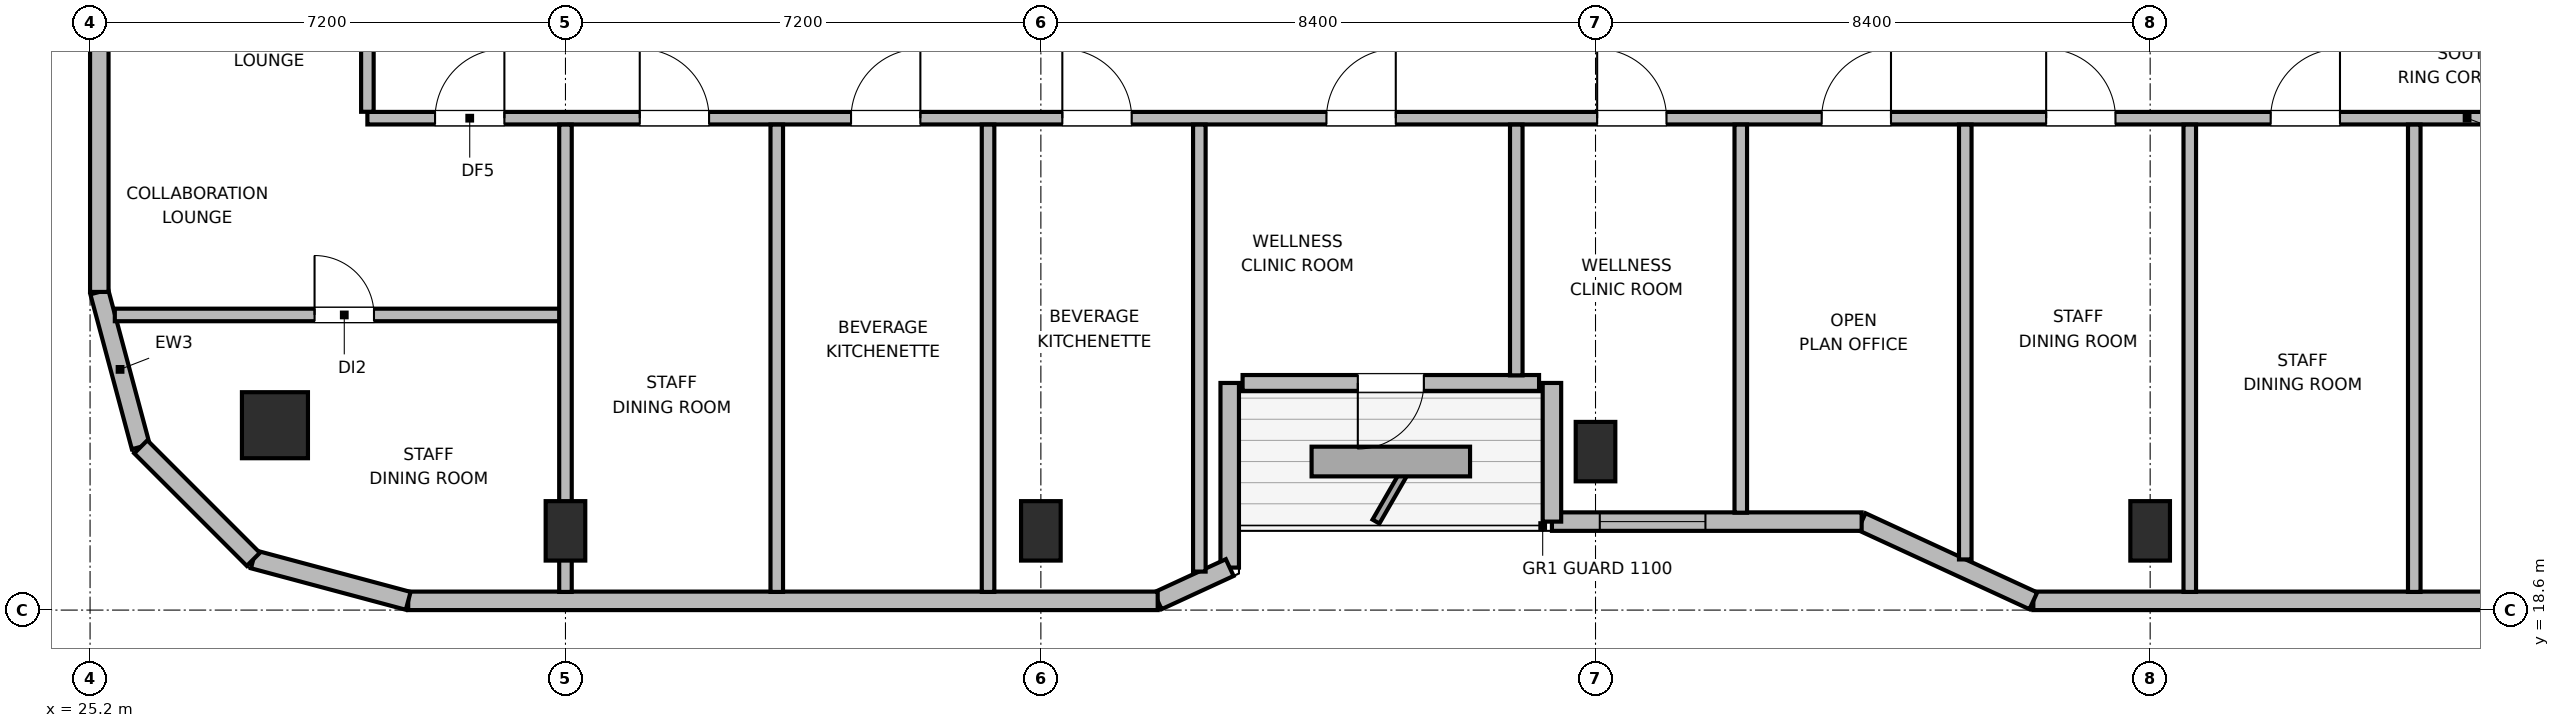
"""IFC4 building model, lengths in metres.
Left out: names, types, materials, properties, quantities, classifications, styles, units other than length and angle.
Written with IfcOpenShell. Run it as: python <this file> out.ifc"""

import sys

from ifc_helpers import new_model, si_unit, direction, frame, frame_2d, origin, origin_2d, place, context, subcontext, project, spatial, rectangle, circle, extrude, element, fill, save


model = new_model("IFC4")
c1 = context("Model", 3, precision=1e-05, world=origin(), true_north=direction((0.0, 1.0)))
c2 = subcontext(c1, "Body", "Model", "MODEL_VIEW")
j1 = project(units=[si_unit("LENGTHUNIT", "METRE"), si_unit("PLANEANGLEUNIT", "RADIAN")], contexts=[c1])
p1 = place(None, origin())
s1 = spatial("IfcSite", under=j1, at=p1, CompositionType="ELEMENT")
p2 = place(p1, origin())
s2 = spatial("IfcBuilding", under=s1, at=p2, CompositionType="ELEMENT")
p3 = place(p2, frame((0.0, 0.0, 346.5)))
s3 = spatial("IfcBuildingStorey", under=s2, at=p3, CompositionType="ELEMENT", Elevation=346.5)
p4 = place(p3, frame((28.0, 21.4, 0.0), z_axis=(0.0, 0.0, 1.0), x_axis=(1.0, 0.0, 0.0)))
e1 = element("IfcColumn", 1, at=p4, inside=s3, PredefinedType="COLUMN", context=c2, shape_type="SweptSolid", body=[
    extrude(circle(Radius=0.5, at=origin_2d()), origin(), (0.0, 0.0, 1.0), 3.9),
])
for number, where, z_axis, x_axis in (
    (2, (32.4, 19.8, 0.0), (0.0, 0.0, 1.0), (1.0, 0.0, 0.0)),
    (3, (39.6, 19.8, 0.0), (0.0, 0.0, 1.0), (1.0, 0.0, 0.0)),
    (4, (48.0, 21.0, 0.0), (0.0, 0.0, 1.0), (1.0, 0.0, 0.0)),
    (5, (56.4, 19.8, 0.0), (0.0, 0.0, 1.0), (1.0, 0.0, 0.0)),
):
    element("IfcColumn", number, at=place(p3, frame(where, z_axis=z_axis, x_axis=x_axis)), inside=s3, PredefinedType="COLUMN", context=c2, shape_type="SweptSolid", body=[
        extrude(rectangle(XDim=0.6, YDim=0.9, at=origin_2d()), origin(), (0.0, 0.0, 1.0), 3.9),
    ])
p5 = place(p3, frame((25.969, 21.073, 0.0), z_axis=(0.0, 0.0, 1.0), x_axis=(-0.258751159445, 0.965944013639, 0.0)))
e6 = element("IfcWall", 6, at=p5, inside=s3, PredefinedType="SOLIDWALL", context=c2, shape_type="SweptSolid", body=[
    extrude(rectangle(XDim=2.429, YDim=0.28, at=frame_2d((1.214, 0.0))), origin(), (0.0, 0.0, 1.0), 3.68),
])
p6 = place(p3, frame((25.34, 23.418, 0.0), z_axis=(0.0, 0.0, 1.0), x_axis=(0.0, 1.0, 0.0)))
e7 = element("IfcWall", 7, at=p6, inside=s3, PredefinedType="SOLIDWALL", context=c2, shape_type="SweptSolid", body=[
    extrude(rectangle(XDim=5.842, YDim=0.28, at=frame_2d((2.921, 0.0))), origin(), (0.0, 0.0, 1.0), 3.68),
])
p7 = place(p3, frame((65.982, 18.74, 0.0), z_axis=(0.0, 0.0, 1.0), x_axis=(-1.0, 0.0, 0.0)))
e8 = element("IfcWall", 8, at=p7, inside=s3, PredefinedType="SOLIDWALL", context=c2, shape_type="SweptSolid", body=[
    extrude(rectangle(XDim=11.351, YDim=0.28, at=frame_2d((5.676, 0.0))), origin(), (0.0, 0.0, 1.0), 3.68),
])
p8 = place(p7, frame((1.686, 0.0, 0.85)))
e9 = element("IfcOpeningElement", 9, at=p8, cuts=e8, PredefinedType="OPENING", context=c2, shape_type="SweptSolid", body=[
    extrude(rectangle(XDim=2.4, YDim=1.15, at=frame_2d((1.2, 0.575))), frame((0.0, 0.15, 0.0), z_axis=(0.0, -1.0, 0.0), x_axis=(1.0, 0.0, 0.0)), (0.0, 0.0, 1.0), 0.3),
])
p9 = place(p3, frame((54.631, 18.74, 0.0), z_axis=(0.0, 0.0, 1.0), x_axis=(-0.907956889006, 0.419063584324, 0.0)))
e10 = element("IfcWall", 10, at=p9, inside=s3, PredefinedType="SOLIDWALL", context=c2, shape_type="SweptSolid", body=[
    extrude(rectangle(XDim=2.864, YDim=0.28, at=frame_2d((1.432, 0.0))), origin(), (0.0, 0.0, 1.0), 2.215),
])
p10 = place(p3, frame((52.031, 19.94, 0.0), z_axis=(0.0, 0.0, 1.0), x_axis=(-1.0, 0.0, 0.0)))
e11 = element("IfcWall", 11, at=p10, inside=s3, PredefinedType="SOLIDWALL", context=c2, shape_type="SweptSolid", body=[
    extrude(rectangle(XDim=4.691, YDim=0.28, at=frame_2d((2.345, 0.0))), origin(), (0.0, 0.0, 1.0), 2.215),
])
p11 = place(p10, frame((2.366, 0.0, 0.85)))
e12 = element("IfcOpeningElement", 12, at=p11, cuts=e11, PredefinedType="OPENING", context=c2, shape_type="SweptSolid", body=[
    extrude(rectangle(XDim=1.6, YDim=1.0, at=frame_2d((0.8, 0.5))), frame((0.0, 0.15, 0.0), z_axis=(0.0, -1.0, 0.0), x_axis=(1.0, 0.0, 0.0)), (0.0, 0.0, 1.0), 0.3),
])
p12 = place(p3, frame((47.34, 19.94, 0.0), z_axis=(0.0, 0.0, 1.0), x_axis=(0.0, 1.0, 0.0)))
e13 = element("IfcWall", 13, at=p12, inside=s3, PredefinedType="SOLIDWALL", context=c2, shape_type="SweptSolid", body=[
    extrude(rectangle(XDim=2.1, YDim=0.28, at=frame_2d((1.05, 0.0))), origin(), (0.0, 0.0, 1.0), 2.215),
])
p13 = place(p3, frame((47.145, 22.04, 0.0), z_axis=(0.0, 0.0, 1.0), x_axis=(-1.0, 0.0, 0.0)))
e14 = element("IfcWall", 14, at=p13, inside=s3, PredefinedType="SOLIDWALL", context=c2, shape_type="SweptSolid", body=[
    extrude(rectangle(XDim=4.49, YDim=0.24, at=frame_2d((2.245, 0.0))), origin(), (0.0, 0.0, 1.0), 3.68),
])
p14 = place(p13, frame((1.745, 0.0, 0.0)))
e15 = element("IfcOpeningElement", 15, at=p14, cuts=e14, PredefinedType="OPENING", context=c2, shape_type="SweptSolid", body=[
    extrude(rectangle(XDim=1.0, YDim=2.02, at=frame_2d((0.5, 1.01))), frame((0.0, 0.13, 0.0), z_axis=(0.0, -1.0, 0.0), x_axis=(1.0, 0.0, 0.0)), (0.0, 0.0, 1.0), 0.26),
])
p15 = place(p3, frame((42.46, 22.04, 0.0), z_axis=(0.0, 0.0, 1.0), x_axis=(0.0, -1.0, 0.0)))
e16 = element("IfcWall", 16, at=p15, inside=s3, PredefinedType="SOLIDWALL", context=c2, shape_type="SweptSolid", body=[
    extrude(rectangle(XDim=2.796, YDim=0.28, at=frame_2d((1.398, 0.0))), origin(), (0.0, 0.0, 1.0), 2.215),
])
p16 = place(p3, frame((42.46, 19.244, 0.0), z_axis=(0.0, 0.0, 1.0), x_axis=(-0.907893953211, -0.419199916176, 0.0)))
e17 = element("IfcWall", 17, at=p16, inside=s3, PredefinedType="SOLIDWALL", context=c2, shape_type="SweptSolid", body=[
    extrude(rectangle(XDim=1.201, YDim=0.28, at=frame_2d((0.601, 0.0))), origin(), (0.0, 0.0, 1.0), 3.68),
])
p17 = place(p3, frame((41.369, 18.74, 0.0), z_axis=(0.0, 0.0, 1.0), x_axis=(-1.0, 0.0, 0.0)))
e18 = element("IfcWall", 18, at=p17, inside=s3, PredefinedType="SOLIDWALL", context=c2, shape_type="SweptSolid", body=[
    extrude(rectangle(XDim=11.351, YDim=0.28, at=frame_2d((5.675, 0.0))), origin(), (0.0, 0.0, 1.0), 3.68),
])
p18 = place(p3, frame((30.018, 18.74, 0.0), z_axis=(0.0, 0.0, 1.0), x_axis=(-0.965937282298, 0.25877628691, 0.0)))
e19 = element("IfcWall", 19, at=p18, inside=s3, PredefinedType="SOLIDWALL", context=c2, shape_type="SweptSolid", body=[
    extrude(rectangle(XDim=2.428, YDim=0.28, at=frame_2d((1.214, 0.0))), origin(), (0.0, 0.0, 1.0), 3.68),
])
p19 = place(p3, frame((27.673, 19.368, 0.0), z_axis=(0.0, 0.0, 1.0), x_axis=(-0.707106781187, 0.707106781187, 0.0)))
e20 = element("IfcWall", 20, at=p19, inside=s3, PredefinedType="SOLIDWALL", context=c2, shape_type="SweptSolid", body=[
    extrude(rectangle(XDim=2.41, YDim=0.28, at=frame_2d((1.205, 0.0))), origin(), (0.0, 0.0, 1.0), 3.68),
])
p20 = place(p3, frame((29.4, 26.05, 0.0), z_axis=(0.0, 0.0, 1.0), x_axis=(1.0, 0.0, 0.0)))
e21 = element("IfcWall", 21, at=p20, inside=s3, PredefinedType="PLUMBINGWALL", context=c2, shape_type="SweptSolid", body=[
    extrude(rectangle(XDim=37.4, YDim=0.19, at=frame_2d((18.7, 0.0))), origin(), (0.0, 0.0, 1.0), 3.68),
])
p21 = place(p20, frame((1.025, 0.0, 0.0)))
e22 = element("IfcOpeningElement", 22, at=p21, cuts=e21, PredefinedType="OPENING", context=c2, shape_type="SweptSolid", body=[
    extrude(rectangle(XDim=1.05, YDim=2.04, at=frame_2d((0.525, 1.02))), frame((0.0, 0.105, 0.0), z_axis=(0.0, -1.0, 0.0), x_axis=(1.0, 0.0, 0.0)), (0.0, 0.0, 1.0), 0.21),
])
p22 = place(p20, frame((4.125, 0.0, 0.0)))
e23 = element("IfcOpeningElement", 23, at=p22, cuts=e21, PredefinedType="OPENING", context=c2, shape_type="SweptSolid", body=[
    extrude(rectangle(XDim=1.05, YDim=2.04, at=frame_2d((0.525, 1.02))), frame((0.0, 0.105, 0.0), z_axis=(0.0, -1.0, 0.0), x_axis=(1.0, 0.0, 0.0)), (0.0, 0.0, 1.0), 0.21),
])
p23 = place(p20, frame((7.325, 0.0, 0.0)))
e24 = element("IfcOpeningElement", 24, at=p23, cuts=e21, PredefinedType="OPENING", context=c2, shape_type="SweptSolid", body=[
    extrude(rectangle(XDim=1.05, YDim=2.04, at=frame_2d((0.525, 1.02))), frame((0.0, 0.105, 0.0), z_axis=(0.0, -1.0, 0.0), x_axis=(1.0, 0.0, 0.0)), (0.0, 0.0, 1.0), 0.21),
])
p24 = place(p20, frame((10.525, 0.0, 0.0)))
e25 = element("IfcOpeningElement", 25, at=p24, cuts=e21, PredefinedType="OPENING", context=c2, shape_type="SweptSolid", body=[
    extrude(rectangle(XDim=1.05, YDim=2.04, at=frame_2d((0.525, 1.02))), frame((0.0, 0.105, 0.0), z_axis=(0.0, -1.0, 0.0), x_axis=(1.0, 0.0, 0.0)), (0.0, 0.0, 1.0), 0.21),
])
p25 = place(p20, frame((14.525, 0.0, 0.0)))
e26 = element("IfcOpeningElement", 26, at=p25, cuts=e21, PredefinedType="OPENING", context=c2, shape_type="SweptSolid", body=[
    extrude(rectangle(XDim=1.05, YDim=2.04, at=frame_2d((0.525, 1.02))), frame((0.0, 0.105, 0.0), z_axis=(0.0, -1.0, 0.0), x_axis=(1.0, 0.0, 0.0)), (0.0, 0.0, 1.0), 0.21),
])
p26 = place(p20, frame((18.625, 0.0, 0.0)))
e27 = element("IfcOpeningElement", 27, at=p26, cuts=e21, PredefinedType="OPENING", context=c2, shape_type="SweptSolid", body=[
    extrude(rectangle(XDim=1.05, YDim=2.04, at=frame_2d((0.525, 1.02))), frame((0.0, 0.105, 0.0), z_axis=(0.0, -1.0, 0.0), x_axis=(1.0, 0.0, 0.0)), (0.0, 0.0, 1.0), 0.21),
])
p27 = place(p20, frame((22.025, 0.0, 0.0)))
e28 = element("IfcOpeningElement", 28, at=p27, cuts=e21, PredefinedType="OPENING", context=c2, shape_type="SweptSolid", body=[
    extrude(rectangle(XDim=1.05, YDim=2.04, at=frame_2d((0.525, 1.02))), frame((0.0, 0.105, 0.0), z_axis=(0.0, -1.0, 0.0), x_axis=(1.0, 0.0, 0.0)), (0.0, 0.0, 1.0), 0.21),
])
p28 = place(p20, frame((25.425, 0.0, 0.0)))
e29 = element("IfcOpeningElement", 29, at=p28, cuts=e21, PredefinedType="OPENING", context=c2, shape_type="SweptSolid", body=[
    extrude(rectangle(XDim=1.05, YDim=2.04, at=frame_2d((0.525, 1.02))), frame((0.0, 0.105, 0.0), z_axis=(0.0, -1.0, 0.0), x_axis=(1.0, 0.0, 0.0)), (0.0, 0.0, 1.0), 0.21),
])
p29 = place(p20, frame((28.825, 0.0, 0.0)))
e30 = element("IfcOpeningElement", 30, at=p29, cuts=e21, PredefinedType="OPENING", context=c2, shape_type="SweptSolid", body=[
    extrude(rectangle(XDim=1.05, YDim=2.04, at=frame_2d((0.525, 1.02))), frame((0.0, 0.105, 0.0), z_axis=(0.0, -1.0, 0.0), x_axis=(1.0, 0.0, 0.0)), (0.0, 0.0, 1.0), 0.21),
])
p30 = place(p20, frame((33.725, 0.0, 0.0)))
e31 = element("IfcOpeningElement", 31, at=p30, cuts=e21, PredefinedType="OPENING", context=c2, shape_type="SweptSolid", body=[
    extrude(rectangle(XDim=1.05, YDim=2.04, at=frame_2d((0.525, 1.02))), frame((0.0, 0.105, 0.0), z_axis=(0.0, -1.0, 0.0), x_axis=(1.0, 0.0, 0.0)), (0.0, 0.0, 1.0), 0.21),
])
p31 = place(p3, frame((29.4, 26.147, 0.0), z_axis=(0.0, 0.0, 1.0), x_axis=(0.0, 1.0, 0.0)))
e32 = element("IfcWall", 32, at=p31, inside=s3, PredefinedType="PLUMBINGWALL", context=c2, shape_type="SweptSolid", body=[
    extrude(rectangle(XDim=19.706, YDim=0.19, at=frame_2d((9.853, 0.0))), origin(), (0.0, 0.0, 1.0), 3.68),
])
p32 = place(p31, frame((1.903, 0.0, 0.0)))
e33 = element("IfcOpeningElement", 33, at=p32, cuts=e32, PredefinedType="OPENING", context=c2, shape_type="SweptSolid", body=[
    extrude(rectangle(XDim=1.05, YDim=2.04, at=frame_2d((0.525, 1.02))), frame((0.0, 0.105, 0.0), z_axis=(0.0, -1.0, 0.0), x_axis=(1.0, 0.0, 0.0)), (0.0, 0.0, 1.0), 0.21),
])
p33 = place(p31, frame((6.878, 0.0, 0.0)))
e34 = element("IfcOpeningElement", 34, at=p33, cuts=e32, PredefinedType="OPENING", context=c2, shape_type="SweptSolid", body=[
    extrude(rectangle(XDim=1.05, YDim=2.04, at=frame_2d((0.525, 1.02))), frame((0.0, 0.105, 0.0), z_axis=(0.0, -1.0, 0.0), x_axis=(1.0, 0.0, 0.0)), (0.0, 0.0, 1.0), 0.21),
])
p34 = place(p31, frame((11.878, 0.0, 0.0)))
e35 = element("IfcOpeningElement", 35, at=p34, cuts=e32, PredefinedType="OPENING", context=c2, shape_type="SweptSolid", body=[
    extrude(rectangle(XDim=1.05, YDim=2.04, at=frame_2d((0.525, 1.02))), frame((0.0, 0.105, 0.0), z_axis=(0.0, -1.0, 0.0), x_axis=(1.0, 0.0, 0.0)), (0.0, 0.0, 1.0), 0.21),
])
p35 = place(p31, frame((16.853, 0.0, 0.0)))
e36 = element("IfcOpeningElement", 36, at=p35, cuts=e32, PredefinedType="OPENING", context=c2, shape_type="SweptSolid", body=[
    extrude(rectangle(XDim=1.05, YDim=2.04, at=frame_2d((0.525, 1.02))), frame((0.0, 0.105, 0.0), z_axis=(0.0, -1.0, 0.0), x_axis=(1.0, 0.0, 0.0)), (0.0, 0.0, 1.0), 0.21),
])
p36 = place(p3, frame((25.575, 23.07, 0.0), z_axis=(0.0, 0.0, 1.0), x_axis=(1.0, 0.0, 0.0)))
e37 = element("IfcWall", 37, at=p36, inside=s3, PredefinedType="PLUMBINGWALL", context=c2, shape_type="SweptSolid", body=[
    extrude(rectangle(XDim=6.825, YDim=0.19, at=frame_2d((3.413, 0.0))), origin(), (0.0, 0.0, 1.0), 3.311),
])
p37 = place(p36, frame((3.025, 0.0, 0.0)))
e38 = element("IfcOpeningElement", 38, at=p37, cuts=e37, PredefinedType="OPENING", context=c2, shape_type="SweptSolid", body=[
    extrude(rectangle(XDim=0.9, YDim=2.02, at=frame_2d((0.45, 1.01))), frame((0.0, 0.105, 0.0), z_axis=(0.0, -1.0, 0.0), x_axis=(1.0, 0.0, 0.0)), (0.0, 0.0, 1.0), 0.21),
])
p38 = place(p3, frame((32.4, 18.875, 0.0), z_axis=(0.0, 0.0, 1.0), x_axis=(0.0, 1.0, 0.0)))
e39 = element("IfcWall", 39, at=p38, inside=s3, PredefinedType="PLUMBINGWALL", context=c2, shape_type="SweptSolid", body=[
    extrude(rectangle(XDim=7.078, YDim=0.19, at=frame_2d((3.539, 0.0))), origin(), (0.0, 0.0, 1.0), 3.054),
])
for number, where, z_axis, x_axis in (
    (40, (35.6, 18.875, 0.0), (0.0, 0.0, 1.0), (0.0, 1.0, 0.0)),
    (41, (38.8, 18.875, 0.0), (0.0, 0.0, 1.0), (0.0, 1.0, 0.0)),
):
    element("IfcWall", number, at=place(p3, frame(where, z_axis=z_axis, x_axis=x_axis)), inside=s3, PredefinedType="PLUMBINGWALL", context=c2, shape_type="SweptSolid", body=[
        extrude(rectangle(XDim=7.078, YDim=0.19, at=frame_2d((3.539, 0.0))), origin(), (0.0, 0.0, 1.0), 3.68),
    ])
p39 = place(p3, frame((42.0, 19.183, 0.0), z_axis=(0.0, 0.0, 1.0), x_axis=(0.0, 1.0, 0.0)))
e42 = element("IfcWall", 42, at=p39, inside=s3, PredefinedType="PLUMBINGWALL", context=c2, shape_type="SweptSolid", body=[
    extrude(rectangle(XDim=6.77, YDim=0.19, at=frame_2d((3.385, 0.0))), origin(), (0.0, 0.0, 1.0), 3.043),
])
p40 = place(p3, frame((46.8, 22.155, 0.0), z_axis=(0.0, 0.0, 1.0), x_axis=(0.0, 1.0, 0.0)))
e43 = element("IfcWall", 43, at=p40, inside=s3, PredefinedType="PLUMBINGWALL", context=c2, shape_type="SweptSolid", body=[
    extrude(rectangle(XDim=3.798, YDim=0.19, at=frame_2d((1.899, 0.0))), origin(), (0.0, 0.0, 1.0), 3.68),
])
p41 = place(p3, frame((50.2, 20.075, 0.0), z_axis=(0.0, 0.0, 1.0), x_axis=(0.0, 1.0, 0.0)))
e44 = element("IfcWall", 44, at=p41, inside=s3, PredefinedType="PLUMBINGWALL", context=c2, shape_type="SweptSolid", body=[
    extrude(rectangle(XDim=5.878, YDim=0.19, at=frame_2d((2.939, 0.0))), origin(), (0.0, 0.0, 1.0), 3.68),
])
p42 = place(p3, frame((53.6, 19.367, 0.0), z_axis=(0.0, 0.0, 1.0), x_axis=(0.0, 1.0, 0.0)))
e45 = element("IfcWall", 45, at=p42, inside=s3, PredefinedType="PLUMBINGWALL", context=c2, shape_type="SweptSolid", body=[
    extrude(rectangle(XDim=6.586, YDim=0.19, at=frame_2d((3.293, 0.0))), origin(), (0.0, 0.0, 1.0), 3.043),
])
for number, where, z_axis, x_axis in (
    (46, (57.0, 18.875, 0.0), (0.0, 0.0, 1.0), (0.0, 1.0, 0.0)),
    (47, (60.4, 18.875, 0.0), (0.0, 0.0, 1.0), (0.0, 1.0, 0.0)),
):
    element("IfcWall", number, at=place(p3, frame(where, z_axis=z_axis, x_axis=x_axis)), inside=s3, PredefinedType="PLUMBINGWALL", context=c2, shape_type="SweptSolid", body=[
        extrude(rectangle(XDim=7.078, YDim=0.19, at=frame_2d((3.539, 0.0))), origin(), (0.0, 0.0, 1.0), 3.68),
    ])
p43 = place(p11, origin())
e48 = element("IfcWindow", 48, at=p43, inside=s3, PartitioningType="SINGLE_PANEL", PredefinedType="WINDOW", context=c2, shape_type="SweptSolid", body=[
    extrude(rectangle(XDim=1.6, YDim=1.0, at=frame_2d((0.8, 0.5))), frame((0.0, 0.03, 0.0), z_axis=(0.0, -1.0, 0.0), x_axis=(1.0, 0.0, 0.0)), (0.0, 0.0, 1.0), 0.06),
])
fill(e12, e48)
p44 = place(p14, origin())
e49 = element("IfcDoor", 49, at=p44, inside=s3, OperationType="SINGLE_SWING_RIGHT", PredefinedType="DOOR", context=c2, shape_type="SweptSolid", body=[
    extrude(rectangle(XDim=1.0, YDim=2.02, at=frame_2d((0.5, 1.01))), frame((0.0, 0.025, 0.0), z_axis=(0.0, -1.0, 0.0), x_axis=(1.0, 0.0, 0.0)), (0.0, 0.0, 1.0), 0.05),
])
fill(e15, e49)
p45 = place(p37, origin())
e50 = element("IfcDoor", 50, at=p45, inside=s3, OperationType="SINGLE_SWING_LEFT", PredefinedType="DOOR", context=c2, shape_type="SweptSolid", body=[
    extrude(rectangle(XDim=0.9, YDim=2.02, at=frame_2d((0.45, 1.01))), frame((0.0, 0.025, 0.0), z_axis=(0.0, -1.0, 0.0), x_axis=(1.0, 0.0, 0.0)), (0.0, 0.0, 1.0), 0.05),
])
fill(e38, e50)
p46 = place(p21, origin())
e51 = element("IfcDoor", 51, at=p46, inside=s3, OperationType="SINGLE_SWING_RIGHT", PredefinedType="DOOR", context=c2, shape_type="SweptSolid", body=[
    extrude(rectangle(XDim=1.05, YDim=2.04, at=frame_2d((0.525, 1.02))), frame((0.0, 0.025, 0.0), z_axis=(0.0, -1.0, 0.0), x_axis=(1.0, 0.0, 0.0)), (0.0, 0.0, 1.0), 0.05),
])
fill(e22, e51)
p47 = place(p22, origin())
e52 = element("IfcDoor", 52, at=p47, inside=s3, OperationType="SINGLE_SWING_LEFT", PredefinedType="DOOR", context=c2, shape_type="SweptSolid", body=[
    extrude(rectangle(XDim=1.05, YDim=2.04, at=frame_2d((0.525, 1.02))), frame((0.0, 0.025, 0.0), z_axis=(0.0, -1.0, 0.0), x_axis=(1.0, 0.0, 0.0)), (0.0, 0.0, 1.0), 0.05),
])
fill(e23, e52)
p48 = place(p23, origin())
e53 = element("IfcDoor", 53, at=p48, inside=s3, OperationType="SINGLE_SWING_RIGHT", PredefinedType="DOOR", context=c2, shape_type="SweptSolid", body=[
    extrude(rectangle(XDim=1.05, YDim=2.04, at=frame_2d((0.525, 1.02))), frame((0.0, 0.025, 0.0), z_axis=(0.0, -1.0, 0.0), x_axis=(1.0, 0.0, 0.0)), (0.0, 0.0, 1.0), 0.05),
])
fill(e24, e53)
p49 = place(p24, origin())
e54 = element("IfcDoor", 54, at=p49, inside=s3, OperationType="SINGLE_SWING_LEFT", PredefinedType="DOOR", context=c2, shape_type="SweptSolid", body=[
    extrude(rectangle(XDim=1.05, YDim=2.04, at=frame_2d((0.525, 1.02))), frame((0.0, 0.025, 0.0), z_axis=(0.0, -1.0, 0.0), x_axis=(1.0, 0.0, 0.0)), (0.0, 0.0, 1.0), 0.05),
])
fill(e25, e54)
p50 = place(p25, origin())
e55 = element("IfcDoor", 55, at=p50, inside=s3, OperationType="SINGLE_SWING_RIGHT", PredefinedType="DOOR", context=c2, shape_type="SweptSolid", body=[
    extrude(rectangle(XDim=1.05, YDim=2.04, at=frame_2d((0.525, 1.02))), frame((0.0, 0.025, 0.0), z_axis=(0.0, -1.0, 0.0), x_axis=(1.0, 0.0, 0.0)), (0.0, 0.0, 1.0), 0.05),
])
fill(e26, e55)
p51 = place(p26, origin())
e56 = element("IfcDoor", 56, at=p51, inside=s3, OperationType="SINGLE_SWING_LEFT", PredefinedType="DOOR", context=c2, shape_type="SweptSolid", body=[
    extrude(rectangle(XDim=1.05, YDim=2.04, at=frame_2d((0.525, 1.02))), frame((0.0, 0.025, 0.0), z_axis=(0.0, -1.0, 0.0), x_axis=(1.0, 0.0, 0.0)), (0.0, 0.0, 1.0), 0.05),
])
fill(e27, e56)
p52 = place(p27, origin())
e57 = element("IfcDoor", 57, at=p52, inside=s3, OperationType="SINGLE_SWING_RIGHT", PredefinedType="DOOR", context=c2, shape_type="SweptSolid", body=[
    extrude(rectangle(XDim=1.05, YDim=2.04, at=frame_2d((0.525, 1.02))), frame((0.0, 0.025, 0.0), z_axis=(0.0, -1.0, 0.0), x_axis=(1.0, 0.0, 0.0)), (0.0, 0.0, 1.0), 0.05),
])
fill(e28, e57)
p53 = place(p28, origin())
e58 = element("IfcDoor", 58, at=p53, inside=s3, OperationType="SINGLE_SWING_LEFT", PredefinedType="DOOR", context=c2, shape_type="SweptSolid", body=[
    extrude(rectangle(XDim=1.05, YDim=2.04, at=frame_2d((0.525, 1.02))), frame((0.0, 0.025, 0.0), z_axis=(0.0, -1.0, 0.0), x_axis=(1.0, 0.0, 0.0)), (0.0, 0.0, 1.0), 0.05),
])
fill(e29, e58)
p54 = place(p29, origin())
e59 = element("IfcDoor", 59, at=p54, inside=s3, OperationType="SINGLE_SWING_RIGHT", PredefinedType="DOOR", context=c2, shape_type="SweptSolid", body=[
    extrude(rectangle(XDim=1.05, YDim=2.04, at=frame_2d((0.525, 1.02))), frame((0.0, 0.025, 0.0), z_axis=(0.0, -1.0, 0.0), x_axis=(1.0, 0.0, 0.0)), (0.0, 0.0, 1.0), 0.05),
])
fill(e30, e59)
save(model, sys.argv[1])
